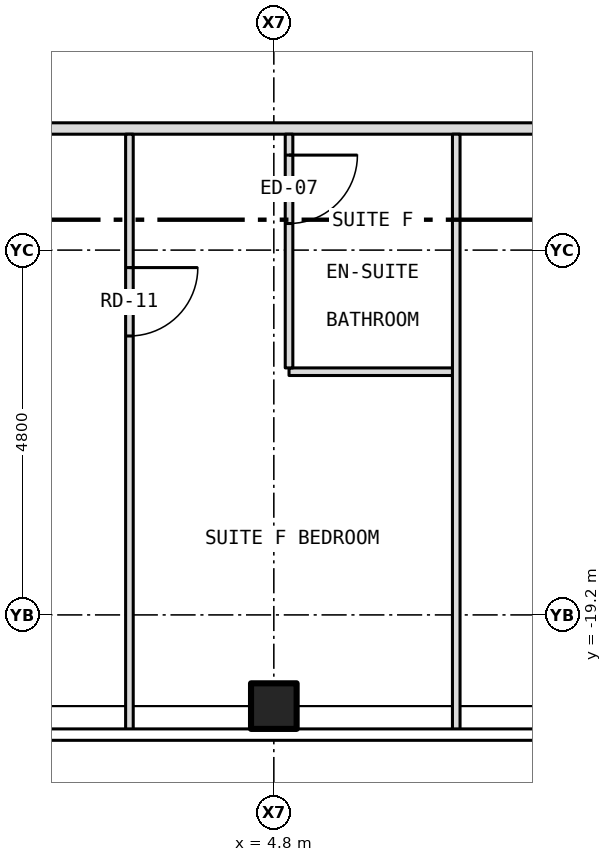
"""IFC4 building model, lengths in metres.
Left out: names, types, materials, properties, quantities, classifications, styles, units other than length and angle.
Written with IfcOpenShell. Run it as: python <this file> out.ifc"""

import sys

from ifc_helpers import new_model, si_unit, direction, frame, frame_2d, origin, origin_2d, place, context, subcontext, project, spatial, rectangle, hollow_rectangle, extrude, element, fill, save


model = new_model("IFC4")
c1 = context("Model", 3, precision=1e-05, world=origin(), true_north=direction((0.0, 1.0)))
c2 = subcontext(c1, "Body", "Model", "MODEL_VIEW")
j1 = project(units=[si_unit("LENGTHUNIT", "METRE"), si_unit("PLANEANGLEUNIT", "RADIAN")], contexts=[c1])
p1 = place(None, origin())
s1 = spatial("IfcSite", under=j1, at=p1, CompositionType="ELEMENT")
p2 = place(p1, origin())
s2 = spatial("IfcBuilding", under=s1, at=p2, CompositionType="ELEMENT")
p3 = place(p2, frame((0.0, 0.0, 262.0)))
s3 = spatial("IfcBuildingStorey", under=s2, at=p3, CompositionType="ELEMENT", Elevation=262.0)
p4 = place(p3, frame((4.8, -20.4, -0.15), z_axis=(0.0, 0.0, 1.0), x_axis=(1.0, 0.0, 0.0)))
e1 = element("IfcColumn", 1, at=p4, inside=s3, PredefinedType="COLUMN", context=c2, shape_type="SweptSolid", body=[
    extrude(hollow_rectangle(XDim=0.6, YDim=0.6, WallThickness=0.03, at=origin_2d()), origin(), (0.0, 0.0, 1.0), 3.4),
])
p5 = place(p3, frame((5.0, -16.0, 0.0), z_axis=(0.0, 0.0, 1.0), x_axis=(1.0, 0.0, 0.0)))
e2 = element("IfcWall", 2, at=p5, inside=s3, PredefinedType="PARTITIONING", context=c2, shape_type="SweptSolid", body=[
    extrude(rectangle(XDim=2.2, YDim=0.1, at=frame_2d((1.1, 0.0))), origin(), (0.0, 0.0, 1.0), 3.25),
])
p6 = place(p3, frame((-15.8, -12.8, 0.0), z_axis=(0.0, 0.0, 1.0), x_axis=(1.0, 0.0, 0.0)))
e3 = element("IfcWall", 3, at=p6, inside=s3, PredefinedType="PARTITIONING", context=c2, shape_type="SweptSolid", body=[
    extrude(rectangle(XDim=31.6, YDim=0.15, at=frame_2d((15.8, 0.0))), origin(), (0.0, 0.0, 1.0), 3.25),
])
p7 = place(p6, frame((6.8, 0.0, 0.0)))
e4 = element("IfcOpeningElement", 4, at=p7, cuts=e3, PredefinedType="OPENING", context=c2, shape_type="SweptSolid", body=[
    extrude(rectangle(XDim=1.0, YDim=2.1, at=frame_2d((0.5, 1.05))), frame((0.0, 0.087, 0.0), z_axis=(0.0, -1.0, 0.0), x_axis=(1.0, 0.0, 0.0)), (0.0, 0.0, 1.0), 0.174),
])
p8 = place(p6, frame((15.35, 0.0, 0.0)))
e5 = element("IfcOpeningElement", 5, at=p8, cuts=e3, PredefinedType="OPENING", context=c2, shape_type="SweptSolid", body=[
    extrude(rectangle(XDim=0.9, YDim=2.1, at=frame_2d((0.45, 1.05))), frame((0.0, 0.087, 0.0), z_axis=(0.0, -1.0, 0.0), x_axis=(1.0, 0.0, 0.0)), (0.0, 0.0, 1.0), 0.174),
])
p9 = place(p6, frame((24.95, 0.0, 0.0)))
e6 = element("IfcOpeningElement", 6, at=p9, cuts=e3, PredefinedType="OPENING", context=c2, shape_type="SweptSolid", body=[
    extrude(rectangle(XDim=0.9, YDim=2.1, at=frame_2d((0.45, 1.05))), frame((0.0, 0.087, 0.0), z_axis=(0.0, -1.0, 0.0), x_axis=(1.0, 0.0, 0.0)), (0.0, 0.0, 1.0), 0.174),
])
p10 = place(p6, frame((1.4, 0.0, 0.0)))
e7 = element("IfcOpeningElement", 7, at=p10, cuts=e3, PredefinedType="OPENING", context=c2, shape_type="SweptSolid", body=[
    extrude(rectangle(XDim=1.0, YDim=2.1, at=frame_2d((0.5, 1.05))), frame((0.0, 0.087, 0.0), z_axis=(0.0, -1.0, 0.0), x_axis=(1.0, 0.0, 0.0)), (0.0, 0.0, 1.0), 0.174),
])
p11 = place(p6, frame((29.2, 0.0, 0.0)))
e8 = element("IfcOpeningElement", 8, at=p11, cuts=e3, PredefinedType="OPENING", context=c2, shape_type="SweptSolid", body=[
    extrude(rectangle(XDim=1.0, YDim=2.1, at=frame_2d((0.5, 1.05))), frame((0.0, 0.087, 0.0), z_axis=(0.0, -1.0, 0.0), x_axis=(1.0, 0.0, 0.0)), (0.0, 0.0, 1.0), 0.174),
])
p12 = place(p3, frame((2.9, -20.73, 0.0), z_axis=(0.0, 0.0, 1.0), x_axis=(0.0, 1.0, 0.0)))
e9 = element("IfcWall", 9, at=p12, inside=s3, PredefinedType="PARTITIONING", context=c2, shape_type="SweptSolid", body=[
    extrude(rectangle(XDim=7.855, YDim=0.1, at=frame_2d((3.927, 0.0))), origin(), (0.0, 0.0, 1.0), 3.25),
])
p13 = place(p12, frame((5.2, 0.0, 0.0)))
e10 = element("IfcOpeningElement", 10, at=p13, cuts=e9, PredefinedType="OPENING", context=c2, shape_type="SweptSolid", body=[
    extrude(rectangle(XDim=0.9, YDim=2.1, at=frame_2d((0.45, 1.05))), frame((0.0, 0.062, 0.0), z_axis=(0.0, -1.0, 0.0), x_axis=(1.0, 0.0, 0.0)), (0.0, 0.0, 1.0), 0.124),
])
p14 = place(p3, frame((5.0, -15.95, 0.0), z_axis=(0.0, 0.0, 1.0), x_axis=(0.0, 1.0, 0.0)))
e11 = element("IfcWall", 11, at=p14, inside=s3, PredefinedType="PARTITIONING", context=c2, shape_type="SweptSolid", body=[
    extrude(rectangle(XDim=3.075, YDim=0.1, at=frame_2d((1.538, 0.0))), origin(), (0.0, 0.0, 1.0), 3.25),
])
p15 = place(p14, frame((1.9, 0.0, 0.0)))
e12 = element("IfcOpeningElement", 12, at=p15, cuts=e11, PredefinedType="OPENING", context=c2, shape_type="SweptSolid", body=[
    extrude(rectangle(XDim=0.9, YDim=2.1, at=frame_2d((0.45, 1.05))), frame((0.0, 0.062, 0.0), z_axis=(0.0, -1.0, 0.0), x_axis=(1.0, 0.0, 0.0)), (0.0, 0.0, 1.0), 0.124),
])
p16 = place(p3, frame((7.2, -20.73, 0.0), z_axis=(0.0, 0.0, 1.0), x_axis=(0.0, 1.0, 0.0)))
e13 = element("IfcWall", 13, at=p16, inside=s3, PredefinedType="PARTITIONING", context=c2, shape_type="SweptSolid", body=[
    extrude(rectangle(XDim=7.855, YDim=0.1, at=frame_2d((3.927, 0.0))), origin(), (0.0, 0.0, 1.0), 3.25),
])
p17 = place(p13, origin())
e14 = element("IfcDoor", 14, at=p17, inside=s3, OperationType="SINGLE_SWING_RIGHT", PredefinedType="DOOR", context=c2, shape_type="SweptSolid", body=[
    extrude(rectangle(XDim=0.9, YDim=2.1, at=frame_2d((0.45, 1.05))), frame((0.0, 0.025, 0.0), z_axis=(0.0, -1.0, 0.0), x_axis=(1.0, 0.0, 0.0)), (0.0, 0.0, 1.0), 0.05),
])
fill(e10, e14)
p18 = place(p15, origin())
e15 = element("IfcDoor", 15, at=p18, inside=s3, OperationType="SINGLE_SWING_RIGHT", PredefinedType="DOOR", context=c2, shape_type="SweptSolid", body=[
    extrude(rectangle(XDim=0.9, YDim=2.1, at=frame_2d((0.45, 1.05))), frame((0.0, 0.025, 0.0), z_axis=(0.0, -1.0, 0.0), x_axis=(1.0, 0.0, 0.0)), (0.0, 0.0, 1.0), 0.05),
])
fill(e12, e15)
save(model, sys.argv[1])
